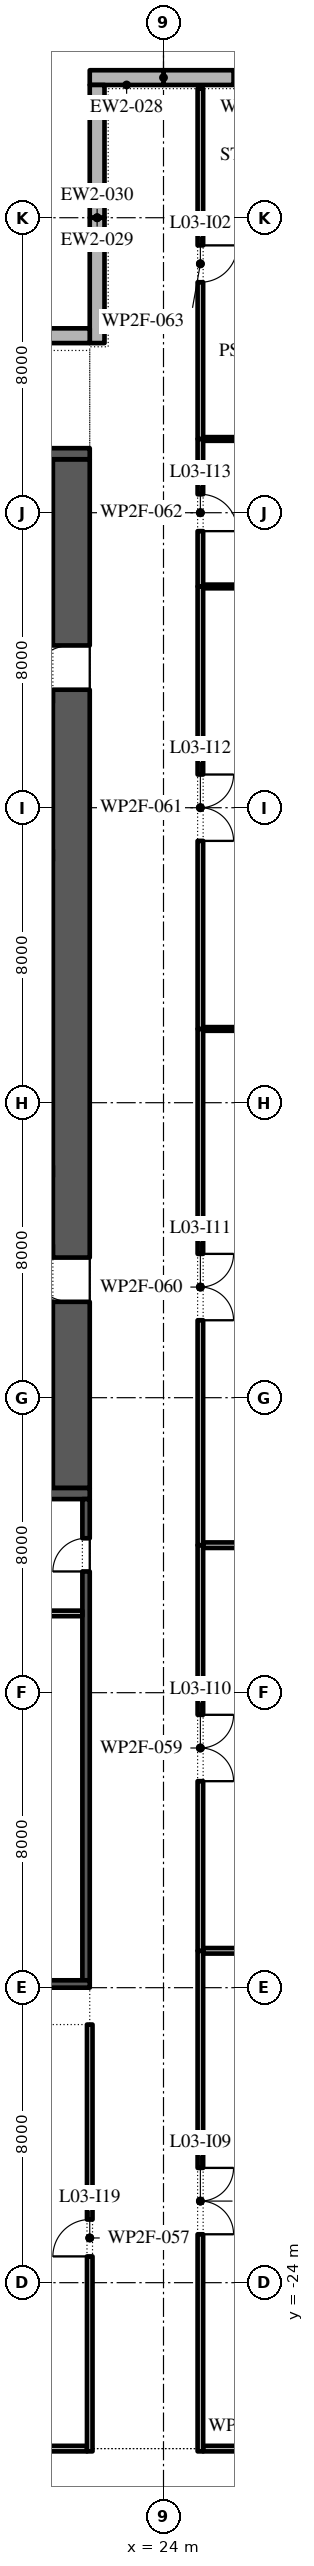
"""IFC4 building model, lengths in metres.
Left out: names, types, materials, properties, quantities, classifications, styles, units other than length and angle.
Written with IfcOpenShell. Run it as: python <this file> out.ifc"""

import sys

from ifc_helpers import new_model, si_unit, direction, frame, frame_2d, origin, place, context, subcontext, project, spatial, polyline, rectangle, outline, extrude, element, fill, save


model = new_model("IFC4")
c1 = context("Model", 3, precision=1e-05, world=origin(), true_north=direction((0.0, 1.0)))
c2 = subcontext(c1, "Body", "Model", "MODEL_VIEW")
j1 = project(units=[si_unit("LENGTHUNIT", "METRE"), si_unit("PLANEANGLEUNIT", "RADIAN")], contexts=[c1])
p1 = place(None, origin())
s1 = spatial("IfcSite", under=j1, at=p1, CompositionType="ELEMENT")
p2 = place(p1, origin())
s2 = spatial("IfcBuilding", under=s1, at=p2, CompositionType="ELEMENT")
p3 = place(p2, frame((0.0, 0.0, 19.2)))
s3 = spatial("IfcBuildingStorey", under=s2, at=p3, CompositionType="ELEMENT", Elevation=19.2)
p4 = place(p3, frame((32.0, 35.8, 0.0), z_axis=(0.0, 0.0, 1.0), x_axis=(-1.0, 0.0, 0.0)))
e1 = element("IfcWall", 1, at=p4, inside=s3, PredefinedType="STANDARD", context=c2, shape_type="SweptSolid", body=[
    extrude(rectangle(XDim=8.0, YDim=0.4, at=frame_2d((4.0, 0.0))), origin(), (0.0, 0.0, 1.0), 4.5),
])
p5 = place(p4, frame((1.9, 0.0, 0.9)))
e2 = element("IfcOpeningElement", 2, at=p5, cuts=e1, PredefinedType="OPENING", context=c2, shape_type="SweptSolid", body=[
    extrude(outline(polyline([(0.0, 0.0), (1.8, 0.0), (1.8, 1.5), (1.785, 1.729), (1.738, 1.954), (1.662, 2.17), (1.558, 2.375), (1.427, 2.563), (1.271, 2.732), (1.095, 2.879), (0.9, 3.0), (0.705, 2.879), (0.529, 2.732), (0.373, 2.563), (0.242, 2.375), (0.138, 2.17), (0.062, 1.954), (0.015, 1.729), (0.0, 1.5), (0.0, 0.0)])), frame((0.0, 0.21, 0.0), z_axis=(0.0, -1.0, 0.0), x_axis=(1.0, 0.0, 0.0)), (0.0, 0.0, 1.0), 0.42),
])
p6 = place(p4, frame((4.3, 0.0, 0.9)))
e3 = element("IfcOpeningElement", 3, at=p6, cuts=e1, PredefinedType="OPENING", context=c2, shape_type="SweptSolid", body=[
    extrude(outline(polyline([(0.0, 0.0), (1.8, 0.0), (1.8, 1.5), (1.785, 1.729), (1.738, 1.954), (1.662, 2.17), (1.558, 2.375), (1.427, 2.563), (1.271, 2.732), (1.095, 2.879), (0.9, 3.0), (0.705, 2.879), (0.529, 2.732), (0.373, 2.563), (0.242, 2.375), (0.138, 2.17), (0.062, 1.954), (0.015, 1.729), (0.0, 1.5), (0.0, 0.0)])), frame((0.0, 0.21, 0.0), z_axis=(0.0, -1.0, 0.0), x_axis=(1.0, 0.0, 0.0)), (0.0, 0.0, 1.0), 0.42),
])
p7 = place(p3, frame((24.0, 35.8, 0.0), z_axis=(0.0, 0.0, 1.0), x_axis=(-1.0, 0.0, 0.0)))
e4 = element("IfcWall", 4, at=p7, inside=s3, PredefinedType="STANDARD", context=c2, shape_type="SweptSolid", body=[
    extrude(rectangle(XDim=2.0, YDim=0.4, at=frame_2d((1.0, 0.0))), origin(), (0.0, 0.0, 1.0), 4.5),
])
p8 = place(p3, frame((22.2, 35.6, 0.0), z_axis=(0.0, 0.0, 1.0), x_axis=(0.0, -1.0, 0.0)))
e5 = element("IfcWall", 5, at=p8, inside=s3, PredefinedType="STANDARD", context=c2, shape_type="SweptSolid", body=[
    extrude(rectangle(XDim=3.6, YDim=0.4, at=frame_2d((1.8, 0.0))), origin(), (0.0, 0.0, 1.0), 4.5),
])
p9 = place(p3, frame((22.2, 32.0, 0.0), z_axis=(0.0, 0.0, 1.0), x_axis=(0.0, -1.0, 0.0)))
e6 = element("IfcWall", 6, at=p9, inside=s3, PredefinedType="STANDARD", context=c2, shape_type="SweptSolid", body=[
    extrude(rectangle(XDim=3.4, YDim=0.4, at=frame_2d((1.7, 0.0))), origin(), (0.0, 0.0, 1.0), 4.5),
])
p10 = place(p3, frame((22.0, 28.8, 0.0), z_axis=(0.0, 0.0, 1.0), x_axis=(-1.0, 0.0, 0.0)))
e7 = element("IfcWall", 7, at=p10, inside=s3, PredefinedType="STANDARD", context=c2, shape_type="SweptSolid", body=[
    extrude(rectangle(XDim=6.0, YDim=0.4, at=frame_2d((3.0, 0.0))), origin(), (0.0, 0.0, 1.0), 4.5),
])
p11 = place(p3, frame((21.5, -2.45, 0.0), z_axis=(0.0, 0.0, 1.0), x_axis=(0.0, 1.0, 0.0)))
e8 = element("IfcWall", 8, at=p11, inside=s3, PredefinedType="SHEAR", context=c2, shape_type="SweptSolid", body=[
    extrude(rectangle(XDim=27.9, YDim=1.0, at=frame_2d((13.95, 0.0))), origin(), (0.0, 0.0, 1.0), 4.5),
])
p12 = place(p11, frame((5.05, 0.0, 0.0)))
e9 = element("IfcOpeningElement", 9, at=p12, cuts=e8, PredefinedType="OPENING", context=c2, shape_type="SweptSolid", body=[
    extrude(rectangle(XDim=1.2, YDim=2.1, at=frame_2d((0.6, 1.05))), frame((0.0, 0.51, 0.0), z_axis=(0.0, -1.0, 0.0), x_axis=(1.0, 0.0, 0.0)), (0.0, 0.0, 1.0), 1.02),
])
p13 = place(p11, frame((21.65, 0.0, 0.0)))
e10 = element("IfcOpeningElement", 10, at=p13, cuts=e8, PredefinedType="OPENING", context=c2, shape_type="SweptSolid", body=[
    extrude(rectangle(XDim=1.2, YDim=2.1, at=frame_2d((0.6, 1.05))), frame((0.0, 0.51, 0.0), z_axis=(0.0, -1.0, 0.0), x_axis=(1.0, 0.0, 0.0)), (0.0, 0.0, 1.0), 1.02),
])
for number, where, z_axis, x_axis in (
    (11, (10.0, -2.6, 0.0), (0.0, 0.0, 1.0), (1.0, 0.0, 0.0)),
    (12, (10.0, 25.6, 0.0), (0.0, 0.0, 1.0), (1.0, 0.0, 0.0)),
):
    element("IfcWall", number, at=place(p3, frame(where, z_axis=z_axis, x_axis=x_axis)), inside=s3, PredefinedType="SHEAR", context=c2, shape_type="SweptSolid", body=[
        extrude(rectangle(XDim=12.0, YDim=0.3, at=frame_2d((6.0, 0.0))), origin(), (0.0, 0.0, 1.0), 4.5),
    ])
for number, where, z_axis, x_axis in (
    (13, (17.3, 4.0, 0.0), (0.0, 0.0, 1.0), (1.0, 0.0, 0.0)),
    (14, (17.3, 19.0, 0.0), (0.0, 0.0, 1.0), (1.0, 0.0, 0.0)),
):
    element("IfcWall", number, at=place(p3, frame(where, z_axis=z_axis, x_axis=x_axis)), inside=s3, PredefinedType="SHEAR", context=c2, shape_type="SweptSolid", body=[
        extrude(rectangle(XDim=3.7, YDim=0.3, at=frame_2d((1.85, 0.0))), origin(), (0.0, 0.0, 1.0), 4.5),
    ])
p14 = place(p3, frame((21.9, -15.8, 0.0), z_axis=(0.0, 0.0, 1.0), x_axis=(0.0, 1.0, 0.0)))
e15 = element("IfcWall", 15, at=p14, inside=s3, PredefinedType="SHEAR", context=c2, shape_type="SweptSolid", body=[
    extrude(rectangle(XDim=13.05, YDim=0.2, at=frame_2d((6.525, 0.0))), origin(), (0.0, 0.0, 1.0), 4.5),
])
p15 = place(p14, frame((11.087, 0.0, 0.0)))
e16 = element("IfcOpeningElement", 16, at=p15, cuts=e15, PredefinedType="OPENING", context=c2, shape_type="SweptSolid", body=[
    extrude(rectangle(XDim=0.9, YDim=2.1, at=frame_2d((0.45, 1.05))), frame((0.0, 0.11, 0.0), z_axis=(0.0, -1.0, 0.0), x_axis=(1.0, 0.0, 0.0)), (0.0, 0.0, 1.0), 0.22),
])
p16 = place(p3, frame((10.0, -15.9, 0.0), z_axis=(0.0, 0.0, 1.0), x_axis=(1.0, 0.0, 0.0)))
e17 = element("IfcWall", 17, at=p16, inside=s3, PredefinedType="SHEAR", context=c2, shape_type="SweptSolid", body=[
    extrude(rectangle(XDim=12.0, YDim=0.2, at=frame_2d((6.0, 0.0))), origin(), (0.0, 0.0, 1.0), 4.5),
])
p17 = place(p3, frame((10.2, -5.85, 0.0), z_axis=(0.0, 0.0, 1.0), x_axis=(1.0, 0.0, 0.0)))
e18 = element("IfcWall", 18, at=p17, inside=s3, PredefinedType="PARTITIONING", context=c2, shape_type="SweptSolid", body=[
    extrude(rectangle(XDim=11.6, YDim=0.15, at=frame_2d((5.8, 0.0))), origin(), (0.0, 0.0, 1.0), 4.5),
])
p18 = place(p3, frame((10.4, -28.5, 0.0), z_axis=(0.0, 0.0, 1.0), x_axis=(1.0, 0.0, 0.0)))
e19 = element("IfcWall", 19, at=p18, inside=s3, PredefinedType="PARTITIONING", context=c2, shape_type="SweptSolid", body=[
    extrude(rectangle(XDim=11.525, YDim=0.15, at=frame_2d((5.763, 0.0))), origin(), (0.0, 0.0, 1.0), 4.5),
])
p19 = place(p3, frame((25.075, -28.5, 0.0), z_axis=(0.0, 0.0, 1.0), x_axis=(1.0, 0.0, 0.0)))
e20 = element("IfcWall", 20, at=p19, inside=s3, PredefinedType="PARTITIONING", context=c2, shape_type="SweptSolid", body=[
    extrude(rectangle(XDim=1.925, YDim=0.15, at=frame_2d((0.962, 0.0))), origin(), (0.0, 0.0, 1.0), 4.5),
])
p20 = place(p3, frame((25.075, -15.0, 0.0), z_axis=(0.0, 0.0, 1.0), x_axis=(1.0, 0.0, 0.0)))
e21 = element("IfcWall", 21, at=p20, inside=s3, PredefinedType="PARTITIONING", context=c2, shape_type="SweptSolid", body=[
    extrude(rectangle(XDim=16.425, YDim=0.15, at=frame_2d((8.212, 0.0))), origin(), (0.0, 0.0, 1.0), 4.5),
])
p21 = place(p3, frame((25.075, -4.0, 0.0), z_axis=(0.0, 0.0, 1.0), x_axis=(1.0, 0.0, 0.0)))
e22 = element("IfcWall", 22, at=p21, inside=s3, PredefinedType="PARTITIONING", context=c2, shape_type="SweptSolid", body=[
    extrude(rectangle(XDim=6.625, YDim=0.15, at=frame_2d((3.312, 0.0))), origin(), (0.0, 0.0, 1.0), 4.5),
])
p22 = place(p3, frame((25.075, 10.0, 0.0), z_axis=(0.0, 0.0, 1.0), x_axis=(1.0, 0.0, 0.0)))
e23 = element("IfcWall", 23, at=p22, inside=s3, PredefinedType="PARTITIONING", context=c2, shape_type="SweptSolid", body=[
    extrude(rectangle(XDim=7.27, YDim=0.1, at=frame_2d((3.635, 0.0))), origin(), (0.0, 0.0, 1.0), 3.964),
])
p23 = place(p3, frame((25.075, 22.0, 0.0), z_axis=(0.0, 0.0, 1.0), x_axis=(1.0, 0.0, 0.0)))
e24 = element("IfcWall", 24, at=p23, inside=s3, PredefinedType="PARTITIONING", context=c2, shape_type="SweptSolid", body=[
    extrude(rectangle(XDim=16.425, YDim=0.1, at=frame_2d((8.212, 0.0))), origin(), (0.0, 0.0, 1.0), 4.5),
])
p24 = place(p3, frame((25.075, 26.0, 0.0), z_axis=(0.0, 0.0, 1.0), x_axis=(1.0, 0.0, 0.0)))
e25 = element("IfcWall", 25, at=p24, inside=s3, PredefinedType="PARTITIONING", context=c2, shape_type="SweptSolid", body=[
    extrude(rectangle(XDim=8.925, YDim=0.1, at=frame_2d((4.462, 0.0))), origin(), (0.0, 0.0, 1.0), 4.5),
])
p25 = place(p3, frame((22.0, -28.575, 0.0), z_axis=(0.0, 0.0, 1.0), x_axis=(0.0, 1.0, 0.0)))
e26 = element("IfcWall", 26, at=p25, inside=s3, PredefinedType="PARTITIONING", context=c2, shape_type="SweptSolid", body=[
    extrude(rectangle(XDim=11.575, YDim=0.15, at=frame_2d((5.788, 0.0))), origin(), (0.0, 0.0, 1.0), 4.5),
])
p26 = place(p25, frame((5.288, 0.0, 0.0)))
e27 = element("IfcOpeningElement", 27, at=p26, cuts=e26, PredefinedType="OPENING", context=c2, shape_type="SweptSolid", body=[
    extrude(rectangle(XDim=1.0, YDim=2.1, at=frame_2d((0.5, 1.05))), frame((0.0, 0.085, 0.0), z_axis=(0.0, -1.0, 0.0), x_axis=(1.0, 0.0, 0.0)), (0.0, 0.0, 1.0), 0.17),
])
p27 = place(p3, frame((25.0, -28.575, 0.0), z_axis=(0.0, 0.0, 1.0), x_axis=(0.0, 1.0, 0.0)))
e28 = element("IfcWall", 28, at=p27, inside=s3, PredefinedType="PARTITIONING", context=c2, shape_type="SweptSolid", body=[
    extrude(rectangle(XDim=13.575, YDim=0.15, at=frame_2d((6.788, 0.0))), origin(), (0.0, 0.0, 1.0), 4.5),
])
p28 = place(p27, frame((5.887, 0.0, 0.0)))
e29 = element("IfcOpeningElement", 29, at=p28, cuts=e28, PredefinedType="OPENING", context=c2, shape_type="SweptSolid", body=[
    extrude(rectangle(XDim=1.8, YDim=2.1, at=frame_2d((0.9, 1.05))), frame((0.0, 0.085, 0.0), z_axis=(0.0, -1.0, 0.0), x_axis=(1.0, 0.0, 0.0)), (0.0, 0.0, 1.0), 0.17),
])
p29 = place(p3, frame((25.0, -15.0, 0.0), z_axis=(0.0, 0.0, 1.0), x_axis=(0.0, 1.0, 0.0)))
e30 = element("IfcWall", 30, at=p29, inside=s3, PredefinedType="PARTITIONING", context=c2, shape_type="SweptSolid", body=[
    extrude(rectangle(XDim=11.0, YDim=0.15, at=frame_2d((5.5, 0.0))), origin(), (0.0, 0.0, 1.0), 4.5),
])
p30 = place(p29, frame((4.6, 0.0, 0.0)))
e31 = element("IfcOpeningElement", 31, at=p30, cuts=e30, PredefinedType="OPENING", context=c2, shape_type="SweptSolid", body=[
    extrude(rectangle(XDim=1.8, YDim=2.1, at=frame_2d((0.9, 1.05))), frame((0.0, 0.085, 0.0), z_axis=(0.0, -1.0, 0.0), x_axis=(1.0, 0.0, 0.0)), (0.0, 0.0, 1.0), 0.17),
])
p31 = place(p3, frame((25.0, -4.0, 0.0), z_axis=(0.0, 0.0, 1.0), x_axis=(0.0, 1.0, 0.0)))
e32 = element("IfcWall", 32, at=p31, inside=s3, PredefinedType="PARTITIONING", context=c2, shape_type="SweptSolid", body=[
    extrude(rectangle(XDim=14.0, YDim=0.15, at=frame_2d((7.0, 0.0))), origin(), (0.0, 0.0, 1.0), 4.5),
])
p32 = place(p31, frame((6.1, 0.0, 0.0)))
e33 = element("IfcOpeningElement", 33, at=p32, cuts=e32, PredefinedType="OPENING", context=c2, shape_type="SweptSolid", body=[
    extrude(rectangle(XDim=1.8, YDim=2.1, at=frame_2d((0.9, 1.05))), frame((0.0, 0.085, 0.0), z_axis=(0.0, -1.0, 0.0), x_axis=(1.0, 0.0, 0.0)), (0.0, 0.0, 1.0), 0.17),
])
p33 = place(p3, frame((25.0, 10.0, 0.0), z_axis=(0.0, 0.0, 1.0), x_axis=(0.0, 1.0, 0.0)))
e34 = element("IfcWall", 34, at=p33, inside=s3, PredefinedType="PARTITIONING", context=c2, shape_type="SweptSolid", body=[
    extrude(rectangle(XDim=12.0, YDim=0.15, at=frame_2d((6.0, 0.0))), origin(), (0.0, 0.0, 1.0), 4.5),
])
p34 = place(p33, frame((5.1, 0.0, 0.0)))
e35 = element("IfcOpeningElement", 35, at=p34, cuts=e34, PredefinedType="OPENING", context=c2, shape_type="SweptSolid", body=[
    extrude(rectangle(XDim=1.8, YDim=2.1, at=frame_2d((0.9, 1.05))), frame((0.0, 0.085, 0.0), z_axis=(0.0, -1.0, 0.0), x_axis=(1.0, 0.0, 0.0)), (0.0, 0.0, 1.0), 0.17),
])
p35 = place(p3, frame((25.0, 22.0, 0.0), z_axis=(0.0, 0.0, 1.0), x_axis=(0.0, 1.0, 0.0)))
e36 = element("IfcWall", 36, at=p35, inside=s3, PredefinedType="PARTITIONING", context=c2, shape_type="SweptSolid", body=[
    extrude(rectangle(XDim=4.0, YDim=0.15, at=frame_2d((2.0, 0.0))), origin(), (0.0, 0.0, 1.0), 4.5),
])
p36 = place(p35, frame((1.5, 0.0, 0.0)))
e37 = element("IfcOpeningElement", 37, at=p36, cuts=e36, PredefinedType="OPENING", context=c2, shape_type="SweptSolid", body=[
    extrude(rectangle(XDim=1.0, YDim=2.1, at=frame_2d((0.5, 1.05))), frame((0.0, 0.085, 0.0), z_axis=(0.0, -1.0, 0.0), x_axis=(1.0, 0.0, 0.0)), (0.0, 0.0, 1.0), 0.17),
])
p37 = place(p3, frame((25.0, 26.0, 0.0), z_axis=(0.0, 0.0, 1.0), x_axis=(0.0, 1.0, 0.0)))
e38 = element("IfcWall", 38, at=p37, inside=s3, PredefinedType="PARTITIONING", context=c2, shape_type="SweptSolid", body=[
    extrude(rectangle(XDim=9.5, YDim=0.15, at=frame_2d((4.75, 0.0))), origin(), (0.0, 0.0, 1.0), 4.5),
])
p38 = place(p37, frame((4.25, 0.0, 0.0)))
e39 = element("IfcOpeningElement", 39, at=p38, cuts=e38, PredefinedType="OPENING", context=c2, shape_type="SweptSolid", body=[
    extrude(rectangle(XDim=1.0, YDim=2.1, at=frame_2d((0.5, 1.05))), frame((0.0, 0.085, 0.0), z_axis=(0.0, -1.0, 0.0), x_axis=(1.0, 0.0, 0.0)), (0.0, 0.0, 1.0), 0.17),
])
p39 = place(p6, origin())
e40 = element("IfcWindow", 40, at=p39, inside=s3, PartitioningType="DOUBLE_PANEL_VERTICAL", PredefinedType="WINDOW", context=c2, shape_type="SweptSolid", body=[
    extrude(outline(polyline([(0.0, 0.0), (1.8, 0.0), (1.8, 1.5), (1.785, 1.729), (1.738, 1.954), (1.662, 2.17), (1.558, 2.375), (1.427, 2.563), (1.271, 2.732), (1.095, 2.879), (0.9, 3.0), (0.705, 2.879), (0.529, 2.732), (0.373, 2.563), (0.242, 2.375), (0.138, 2.17), (0.062, 1.954), (0.015, 1.729), (0.0, 1.5), (0.0, 0.0)])), frame((0.0, 0.03, 0.0), z_axis=(0.0, -1.0, 0.0), x_axis=(1.0, 0.0, 0.0)), (0.0, 0.0, 1.0), 0.06),
])
fill(e3, e40)
p40 = place(p12, origin())
e41 = element("IfcDoor", 41, at=p40, inside=s3, OperationType="SINGLE_SWING_LEFT", PredefinedType="DOOR", context=c2, shape_type="SweptSolid", body=[
    extrude(rectangle(XDim=1.2, YDim=2.1, at=frame_2d((0.6, 1.05))), frame((0.0, 0.025, 0.0), z_axis=(0.0, -1.0, 0.0), x_axis=(1.0, 0.0, 0.0)), (0.0, 0.0, 1.0), 0.05),
])
fill(e9, e41)
p41 = place(p13, origin())
e42 = element("IfcDoor", 42, at=p41, inside=s3, OperationType="SINGLE_SWING_RIGHT", PredefinedType="DOOR", context=c2, shape_type="SweptSolid", body=[
    extrude(rectangle(XDim=1.2, YDim=2.1, at=frame_2d((0.6, 1.05))), frame((0.0, 0.025, 0.0), z_axis=(0.0, -1.0, 0.0), x_axis=(1.0, 0.0, 0.0)), (0.0, 0.0, 1.0), 0.05),
])
fill(e10, e42)
p42 = place(p15, origin())
e43 = element("IfcDoor", 43, at=p42, inside=s3, OperationType="SINGLE_SWING_RIGHT", PredefinedType="DOOR", context=c2, shape_type="SweptSolid", body=[
    extrude(rectangle(XDim=0.9, YDim=2.1, at=frame_2d((0.45, 1.05))), frame((0.0, 0.1, 0.0), z_axis=(0.0, -1.0, 0.0), x_axis=(1.0, 0.0, 0.0)), (0.0, 0.0, 1.0), 0.05),
])
fill(e16, e43)
p43 = place(p38, frame((1.0, 0.0, 0.0), z_axis=(0.0, 0.0, 1.0), x_axis=(-1.0, 0.0, 0.0)))
e44 = element("IfcDoor", 44, at=p43, inside=s3, OperationType="SINGLE_SWING_RIGHT", PredefinedType="DOOR", context=c2, shape_type="SweptSolid", body=[
    extrude(rectangle(XDim=1.0, YDim=2.1, at=frame_2d((0.5, 1.05))), frame((0.0, 0.025, 0.0), z_axis=(0.0, -1.0, 0.0), x_axis=(1.0, 0.0, 0.0)), (0.0, 0.0, 1.0), 0.05),
])
fill(e39, e44)
p44 = place(p28, frame((1.8, 0.0, 0.0), z_axis=(0.0, 0.0, 1.0), x_axis=(-1.0, 0.0, 0.0)))
e45 = element("IfcDoor", 45, at=p44, inside=s3, OperationType="SINGLE_SWING_RIGHT", PredefinedType="DOOR", context=c2, shape_type="SweptSolid", body=[
    extrude(rectangle(XDim=1.8, YDim=2.1, at=frame_2d((0.9, 1.05))), frame((0.0, 0.025, 0.0), z_axis=(0.0, -1.0, 0.0), x_axis=(1.0, 0.0, 0.0)), (0.0, 0.0, 1.0), 0.05),
])
fill(e29, e45)
p45 = place(p30, frame((1.8, 0.0, 0.0), z_axis=(0.0, 0.0, 1.0), x_axis=(-1.0, 0.0, 0.0)))
e46 = element("IfcDoor", 46, at=p45, inside=s3, OperationType="SINGLE_SWING_LEFT", PredefinedType="DOOR", context=c2, shape_type="SweptSolid", body=[
    extrude(rectangle(XDim=1.8, YDim=2.1, at=frame_2d((0.9, 1.05))), frame((0.0, 0.025, 0.0), z_axis=(0.0, -1.0, 0.0), x_axis=(1.0, 0.0, 0.0)), (0.0, 0.0, 1.0), 0.05),
])
fill(e31, e46)
p46 = place(p32, frame((1.8, 0.0, 0.0), z_axis=(0.0, 0.0, 1.0), x_axis=(-1.0, 0.0, 0.0)))
e47 = element("IfcDoor", 47, at=p46, inside=s3, OperationType="SINGLE_SWING_LEFT", PredefinedType="DOOR", context=c2, shape_type="SweptSolid", body=[
    extrude(rectangle(XDim=1.8, YDim=2.1, at=frame_2d((0.9, 1.05))), frame((0.0, 0.025, 0.0), z_axis=(0.0, -1.0, 0.0), x_axis=(1.0, 0.0, 0.0)), (0.0, 0.0, 1.0), 0.05),
])
fill(e33, e47)
p47 = place(p34, frame((1.8, 0.0, 0.0), z_axis=(0.0, 0.0, 1.0), x_axis=(-1.0, 0.0, 0.0)))
e48 = element("IfcDoor", 48, at=p47, inside=s3, OperationType="SINGLE_SWING_LEFT", PredefinedType="DOOR", context=c2, shape_type="SweptSolid", body=[
    extrude(rectangle(XDim=1.8, YDim=2.1, at=frame_2d((0.9, 1.05))), frame((0.0, 0.025, 0.0), z_axis=(0.0, -1.0, 0.0), x_axis=(1.0, 0.0, 0.0)), (0.0, 0.0, 1.0), 0.05),
])
fill(e35, e48)
p48 = place(p36, frame((1.0, 0.0, 0.0), z_axis=(0.0, 0.0, 1.0), x_axis=(-1.0, 0.0, 0.0)))
e49 = element("IfcDoor", 49, at=p48, inside=s3, OperationType="SINGLE_SWING_LEFT", PredefinedType="DOOR", context=c2, shape_type="SweptSolid", body=[
    extrude(rectangle(XDim=1.0, YDim=2.1, at=frame_2d((0.5, 1.05))), frame((0.0, 0.025, 0.0), z_axis=(0.0, -1.0, 0.0), x_axis=(1.0, 0.0, 0.0)), (0.0, 0.0, 1.0), 0.05),
])
fill(e37, e49)
p49 = place(p26, origin())
e50 = element("IfcDoor", 50, at=p49, inside=s3, OperationType="SINGLE_SWING_RIGHT", PredefinedType="DOOR", context=c2, shape_type="SweptSolid", body=[
    extrude(rectangle(XDim=1.0, YDim=2.1, at=frame_2d((0.5, 1.05))), frame((0.0, 0.025, 0.0), z_axis=(0.0, -1.0, 0.0), x_axis=(1.0, 0.0, 0.0)), (0.0, 0.0, 1.0), 0.05),
])
fill(e27, e50)
save(model, sys.argv[1])
